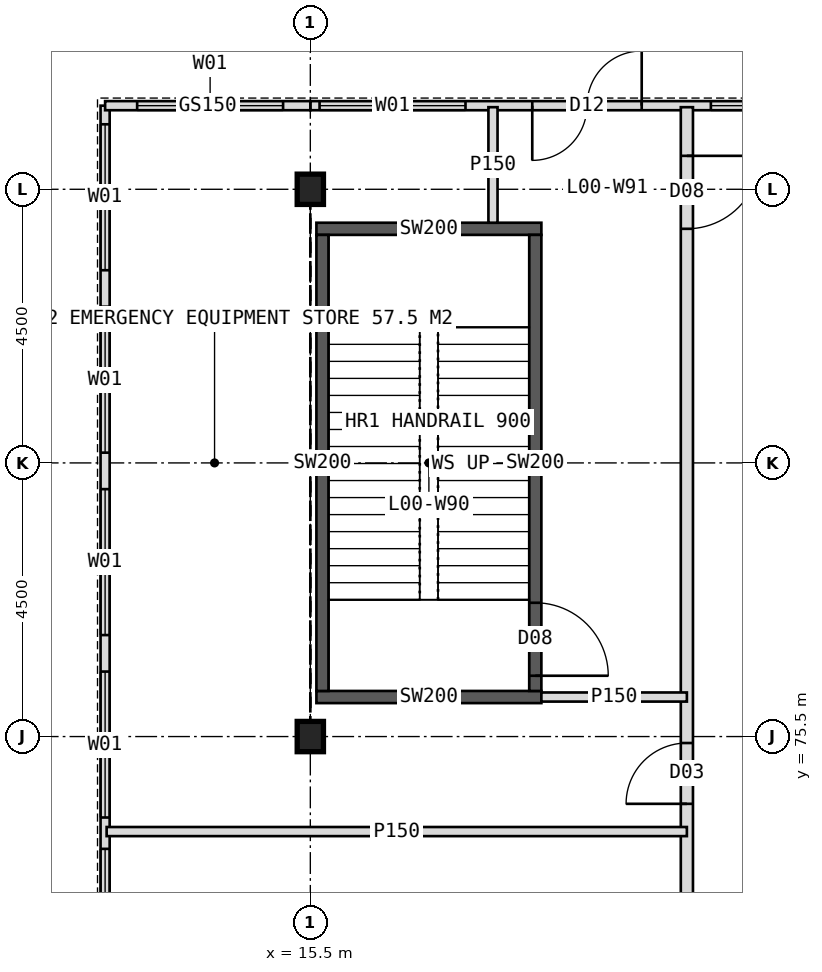
"""IFC4 building model, lengths in metres.
Left out: names, types, materials, properties, quantities, classifications, styles, units other than length and angle.
Written with IfcOpenShell. Run it as: python <this file> out.ifc"""

import sys

from ifc_helpers import new_model, si_unit, direction, frame, frame_2d, origin, origin_2d, place, context, subcontext, project, spatial, rectangle, i_section, extrude, element, fill, save


model = new_model("IFC4")
c1 = context("Model", 3, precision=1e-05, world=origin(), true_north=direction((0.0, 1.0)))
c2 = subcontext(c1, "Body", "Model", "MODEL_VIEW")
j1 = project(units=[si_unit("LENGTHUNIT", "METRE"), si_unit("PLANEANGLEUNIT", "RADIAN")], contexts=[c1])
p1 = place(None, origin())
s1 = spatial("IfcSite", under=j1, at=p1, CompositionType="ELEMENT")
p2 = place(p1, origin())
s2 = spatial("IfcBuilding", under=s1, at=p2, CompositionType="ELEMENT")
p3 = place(p2, origin())
s3 = spatial("IfcBuildingStorey", under=s2, at=p3, CompositionType="ELEMENT", Elevation=0.0)
for number, where, z_axis, x_axis in (
    (1, (15.5, 75.5, 0.0), (0.0, 0.0, 1.0), (1.0, 0.0, 0.0)),
    (2, (15.5, 84.5, 0.0), (0.0, 0.0, 1.0), (1.0, 0.0, 0.0)),
):
    element("IfcColumn", number, at=place(p3, frame(where, z_axis=z_axis, x_axis=x_axis)), inside=s3, PredefinedType="COLUMN", context=c2, shape_type="SweptSolid", body=[
        extrude(i_section(OverallWidth=0.432, OverallDepth=0.498, WebThickness=0.056, FlangeThickness=0.089, FilletRadius=0.015, at=origin_2d()), origin(), (0.0, 0.0, 1.0), 6.0),
    ])
p4 = place(p3, frame((12.125, 85.875, 0.0), z_axis=(0.0, 0.0, 1.0), x_axis=(0.0, -1.0, 0.0)))
e3 = element("IfcWall", 3, at=p4, inside=s3, PredefinedType="STANDARD", context=c2, shape_type="SweptSolid", body=[
    extrude(rectangle(XDim=47.75, YDim=0.15, at=frame_2d((23.875, 0.0))), origin(), (0.0, 0.0, 1.0), 6.0),
])
p5 = place(p4, frame((22.7, 0.0, 0.0)))
e4 = element("IfcOpeningElement", 4, at=p5, cuts=e3, PredefinedType="OPENING", context=c2, shape_type="SweptSolid", body=[
    extrude(rectangle(XDim=2.4, YDim=2.7, at=frame_2d((1.2, 1.35))), frame((0.0, 0.085, 0.0), z_axis=(0.0, -1.0, 0.0), x_axis=(1.0, 0.0, 0.0)), (0.0, 0.0, 1.0), 0.17),
])
p6 = place(p4, frame((0.306, 0.0, 0.6)))
e5 = element("IfcOpeningElement", 5, at=p6, cuts=e3, PredefinedType="OPENING", context=c2, shape_type="SweptSolid", body=[
    extrude(rectangle(XDim=2.4, YDim=3.0, at=frame_2d((1.2, 1.5))), frame((0.0, 0.085, 0.0), z_axis=(0.0, -1.0, 0.0), x_axis=(1.0, 0.0, 0.0)), (0.0, 0.0, 1.0), 0.17),
])
p7 = place(p4, frame((3.306, 0.0, 0.6)))
e6 = element("IfcOpeningElement", 6, at=p7, cuts=e3, PredefinedType="OPENING", context=c2, shape_type="SweptSolid", body=[
    extrude(rectangle(XDim=2.4, YDim=3.0, at=frame_2d((1.2, 1.5))), frame((0.0, 0.085, 0.0), z_axis=(0.0, -1.0, 0.0), x_axis=(1.0, 0.0, 0.0)), (0.0, 0.0, 1.0), 0.17),
])
p8 = place(p4, frame((6.306, 0.0, 0.6)))
e7 = element("IfcOpeningElement", 7, at=p8, cuts=e3, PredefinedType="OPENING", context=c2, shape_type="SweptSolid", body=[
    extrude(rectangle(XDim=2.4, YDim=3.0, at=frame_2d((1.2, 1.5))), frame((0.0, 0.085, 0.0), z_axis=(0.0, -1.0, 0.0), x_axis=(1.0, 0.0, 0.0)), (0.0, 0.0, 1.0), 0.17),
])
p9 = place(p4, frame((9.306, 0.0, 0.6)))
e8 = element("IfcOpeningElement", 8, at=p9, cuts=e3, PredefinedType="OPENING", context=c2, shape_type="SweptSolid", body=[
    extrude(rectangle(XDim=2.4, YDim=3.0, at=frame_2d((1.2, 1.5))), frame((0.0, 0.085, 0.0), z_axis=(0.0, -1.0, 0.0), x_axis=(1.0, 0.0, 0.0)), (0.0, 0.0, 1.0), 0.17),
])
p10 = place(p4, frame((12.222, 0.0, 0.6)))
e9 = element("IfcOpeningElement", 9, at=p10, cuts=e3, PredefinedType="OPENING", context=c2, shape_type="SweptSolid", body=[
    extrude(rectangle(XDim=2.4, YDim=3.0, at=frame_2d((1.2, 1.5))), frame((0.0, 0.085, 0.0), z_axis=(0.0, -1.0, 0.0), x_axis=(1.0, 0.0, 0.0)), (0.0, 0.0, 1.0), 0.17),
])
p11 = place(p4, frame((15.222, 0.0, 0.6)))
e10 = element("IfcOpeningElement", 10, at=p11, cuts=e3, PredefinedType="OPENING", context=c2, shape_type="SweptSolid", body=[
    extrude(rectangle(XDim=2.4, YDim=3.0, at=frame_2d((1.2, 1.5))), frame((0.0, 0.085, 0.0), z_axis=(0.0, -1.0, 0.0), x_axis=(1.0, 0.0, 0.0)), (0.0, 0.0, 1.0), 0.17),
])
p12 = place(p4, frame((18.198, 0.0, 0.6)))
e11 = element("IfcOpeningElement", 11, at=p12, cuts=e3, PredefinedType="OPENING", context=c2, shape_type="SweptSolid", body=[
    extrude(rectangle(XDim=2.4, YDim=3.0, at=frame_2d((1.2, 1.5))), frame((0.0, 0.085, 0.0), z_axis=(0.0, -1.0, 0.0), x_axis=(1.0, 0.0, 0.0)), (0.0, 0.0, 1.0), 0.17),
])
p13 = place(p4, frame((27.131, 0.0, 0.6)))
e12 = element("IfcOpeningElement", 12, at=p13, cuts=e3, PredefinedType="OPENING", context=c2, shape_type="SweptSolid", body=[
    extrude(rectangle(XDim=2.4, YDim=3.0, at=frame_2d((1.2, 1.5))), frame((0.0, 0.085, 0.0), z_axis=(0.0, -1.0, 0.0), x_axis=(1.0, 0.0, 0.0)), (0.0, 0.0, 1.0), 0.17),
])
p14 = place(p4, frame((30.131, 0.0, 0.6)))
e13 = element("IfcOpeningElement", 13, at=p14, cuts=e3, PredefinedType="OPENING", context=c2, shape_type="SweptSolid", body=[
    extrude(rectangle(XDim=2.4, YDim=3.0, at=frame_2d((1.2, 1.5))), frame((0.0, 0.085, 0.0), z_axis=(0.0, -1.0, 0.0), x_axis=(1.0, 0.0, 0.0)), (0.0, 0.0, 1.0), 0.17),
])
p15 = place(p4, frame((33.125, 0.0, 0.6)))
e14 = element("IfcOpeningElement", 14, at=p15, cuts=e3, PredefinedType="OPENING", context=c2, shape_type="SweptSolid", body=[
    extrude(rectangle(XDim=2.4, YDim=3.0, at=frame_2d((1.2, 1.5))), frame((0.0, 0.085, 0.0), z_axis=(0.0, -1.0, 0.0), x_axis=(1.0, 0.0, 0.0)), (0.0, 0.0, 1.0), 0.17),
])
p16 = place(p4, frame((36.125, 0.0, 0.6)))
e15 = element("IfcOpeningElement", 15, at=p16, cuts=e3, PredefinedType="OPENING", context=c2, shape_type="SweptSolid", body=[
    extrude(rectangle(XDim=2.4, YDim=3.0, at=frame_2d((1.2, 1.5))), frame((0.0, 0.085, 0.0), z_axis=(0.0, -1.0, 0.0), x_axis=(1.0, 0.0, 0.0)), (0.0, 0.0, 1.0), 0.17),
])
p17 = place(p4, frame((39.089, 0.0, 0.6)))
e16 = element("IfcOpeningElement", 16, at=p17, cuts=e3, PredefinedType="OPENING", context=c2, shape_type="SweptSolid", body=[
    extrude(rectangle(XDim=2.4, YDim=3.0, at=frame_2d((1.2, 1.5))), frame((0.0, 0.085, 0.0), z_axis=(0.0, -1.0, 0.0), x_axis=(1.0, 0.0, 0.0)), (0.0, 0.0, 1.0), 0.17),
])
p18 = place(p4, frame((42.028, 0.0, 0.6)))
e17 = element("IfcOpeningElement", 17, at=p18, cuts=e3, PredefinedType="OPENING", context=c2, shape_type="SweptSolid", body=[
    extrude(rectangle(XDim=2.4, YDim=3.0, at=frame_2d((1.2, 1.5))), frame((0.0, 0.085, 0.0), z_axis=(0.0, -1.0, 0.0), x_axis=(1.0, 0.0, 0.0)), (0.0, 0.0, 1.0), 0.17),
])
p19 = place(p4, frame((45.028, 0.0, 0.6)))
e18 = element("IfcOpeningElement", 18, at=p19, cuts=e3, PredefinedType="OPENING", context=c2, shape_type="SweptSolid", body=[
    extrude(rectangle(XDim=2.4, YDim=3.0, at=frame_2d((1.2, 1.5))), frame((0.0, 0.085, 0.0), z_axis=(0.0, -1.0, 0.0), x_axis=(1.0, 0.0, 0.0)), (0.0, 0.0, 1.0), 0.17),
])
p20 = place(p3, frame((33.841, 85.875, 0.0), z_axis=(0.0, 0.0, 1.0), x_axis=(-1.0, 0.0, 0.0)))
e19 = element("IfcWall", 19, at=p20, inside=s3, PredefinedType="STANDARD", context=c2, shape_type="SweptSolid", body=[
    extrude(rectangle(XDim=18.341, YDim=0.15, at=frame_2d((9.17, 0.0))), origin(), (0.0, 0.0, 1.0), 5.1),
])
p21 = place(p20, frame((12.891, 0.0, 0.0)))
e20 = element("IfcOpeningElement", 20, at=p21, cuts=e19, PredefinedType="OPENING", context=c2, shape_type="SweptSolid", body=[
    extrude(rectangle(XDim=1.8, YDim=2.4, at=frame_2d((0.9, 1.2))), frame((0.0, 0.085, 0.0), z_axis=(0.0, -1.0, 0.0), x_axis=(1.0, 0.0, 0.0)), (0.0, 0.0, 1.0), 0.17),
])
p22 = place(p20, frame((0.0, 0.0, 0.6)))
e21 = element("IfcOpeningElement", 21, at=p22, cuts=e19, PredefinedType="OPENING", context=c2, shape_type="SweptSolid", body=[
    extrude(rectangle(XDim=2.4, YDim=3.0, at=frame_2d((1.2, 1.5))), frame((0.0, 0.085, 0.0), z_axis=(0.0, -1.0, 0.0), x_axis=(1.0, 0.0, 0.0)), (0.0, 0.0, 1.0), 0.17),
])
p23 = place(p20, frame((3.0, 0.0, 0.6)))
e22 = element("IfcOpeningElement", 22, at=p23, cuts=e19, PredefinedType="OPENING", context=c2, shape_type="SweptSolid", body=[
    extrude(rectangle(XDim=2.4, YDim=3.0, at=frame_2d((1.2, 1.5))), frame((0.0, 0.085, 0.0), z_axis=(0.0, -1.0, 0.0), x_axis=(1.0, 0.0, 0.0)), (0.0, 0.0, 1.0), 0.17),
])
p24 = place(p20, frame((6.0, 0.0, 0.6)))
e23 = element("IfcOpeningElement", 23, at=p24, cuts=e19, PredefinedType="OPENING", context=c2, shape_type="SweptSolid", body=[
    extrude(rectangle(XDim=2.4, YDim=3.0, at=frame_2d((1.2, 1.5))), frame((0.0, 0.085, 0.0), z_axis=(0.0, -1.0, 0.0), x_axis=(1.0, 0.0, 0.0)), (0.0, 0.0, 1.0), 0.17),
])
p25 = place(p20, frame((9.354, 0.0, 0.6)))
e24 = element("IfcOpeningElement", 24, at=p25, cuts=e19, PredefinedType="OPENING", context=c2, shape_type="SweptSolid", body=[
    extrude(rectangle(XDim=2.4, YDim=3.0, at=frame_2d((1.2, 1.5))), frame((0.0, 0.085, 0.0), z_axis=(0.0, -1.0, 0.0), x_axis=(1.0, 0.0, 0.0)), (0.0, 0.0, 1.0), 0.17),
])
p26 = place(p20, frame((15.789, 0.0, 0.6)))
e25 = element("IfcOpeningElement", 25, at=p26, cuts=e19, PredefinedType="OPENING", context=c2, shape_type="SweptSolid", body=[
    extrude(rectangle(XDim=2.4, YDim=3.0, at=frame_2d((1.2, 1.5))), frame((0.0, 0.085, 0.0), z_axis=(0.0, -1.0, 0.0), x_axis=(1.0, 0.0, 0.0)), (0.0, 0.0, 1.0), 0.17),
])
p27 = place(p3, frame((15.5, 85.875, 0.0), z_axis=(0.0, 0.0, 1.0), x_axis=(-1.0, 0.0, 0.0)))
e26 = element("IfcWall", 26, at=p27, inside=s3, PredefinedType="STANDARD", context=c2, shape_type="SweptSolid", body=[
    extrude(rectangle(XDim=3.375, YDim=0.15, at=frame_2d((1.688, 0.0))), origin(), (0.0, 0.0, 1.0), 6.0),
])
p28 = place(p27, frame((0.448, 0.0, 0.6)))
e27 = element("IfcOpeningElement", 27, at=p28, cuts=e26, PredefinedType="OPENING", context=c2, shape_type="SweptSolid", body=[
    extrude(rectangle(XDim=2.4, YDim=3.0, at=frame_2d((1.2, 1.5))), frame((0.0, 0.085, 0.0), z_axis=(0.0, -1.0, 0.0), x_axis=(1.0, 0.0, 0.0)), (0.0, 0.0, 1.0), 0.17),
])
p29 = place(p3, frame((21.693, 38.15, 0.0), z_axis=(0.0, 0.0, 1.0), x_axis=(0.0, 1.0, 0.0)))
e28 = element("IfcWall", 28, at=p29, inside=s3, PredefinedType="PARTITIONING", context=c2, shape_type="SweptSolid", body=[
    extrude(rectangle(XDim=47.7, YDim=0.2, at=frame_2d((23.85, 0.0))), origin(), (0.0, 0.0, 1.0), 5.7),
])
p30 = place(p29, frame((45.7, 0.0, 0.0)))
e29 = element("IfcOpeningElement", 29, at=p30, cuts=e28, PredefinedType="OPENING", context=c2, shape_type="SweptSolid", body=[
    extrude(rectangle(XDim=1.2, YDim=2.1, at=frame_2d((0.6, 1.05))), frame((0.0, 0.11, 0.0), z_axis=(0.0, -1.0, 0.0), x_axis=(1.0, 0.0, 0.0)), (0.0, 0.0, 1.0), 0.22),
])
p31 = place(p29, frame((36.244, 0.0, 0.0)))
e30 = element("IfcOpeningElement", 30, at=p31, cuts=e28, PredefinedType="OPENING", context=c2, shape_type="SweptSolid", body=[
    extrude(rectangle(XDim=1.0, YDim=2.1, at=frame_2d((0.5, 1.05))), frame((0.0, 0.11, 0.0), z_axis=(0.0, -1.0, 0.0), x_axis=(1.0, 0.0, 0.0)), (0.0, 0.0, 1.0), 0.22),
])
p32 = place(p29, frame((2.222, 0.0, 0.0)))
e31 = element("IfcOpeningElement", 31, at=p32, cuts=e28, PredefinedType="OPENING", context=c2, shape_type="SweptSolid", body=[
    extrude(rectangle(XDim=1.4, YDim=2.2, at=frame_2d((0.7, 1.1))), frame((0.0, 0.11, 0.0), z_axis=(0.0, -1.0, 0.0), x_axis=(1.0, 0.0, 0.0)), (0.0, 0.0, 1.0), 0.22),
])
p33 = place(p29, frame((6.836, 0.0, 0.0)))
e32 = element("IfcOpeningElement", 32, at=p33, cuts=e28, PredefinedType="OPENING", context=c2, shape_type="SweptSolid", body=[
    extrude(rectangle(XDim=1.0, YDim=2.1, at=frame_2d((0.5, 1.05))), frame((0.0, 0.11, 0.0), z_axis=(0.0, -1.0, 0.0), x_axis=(1.0, 0.0, 0.0)), (0.0, 0.0, 1.0), 0.22),
])
p34 = place(p29, frame((11.113, 0.0, 0.0)))
e33 = element("IfcOpeningElement", 33, at=p34, cuts=e28, PredefinedType="OPENING", context=c2, shape_type="SweptSolid", body=[
    extrude(rectangle(XDim=1.4, YDim=2.2, at=frame_2d((0.7, 1.1))), frame((0.0, 0.11, 0.0), z_axis=(0.0, -1.0, 0.0), x_axis=(1.0, 0.0, 0.0)), (0.0, 0.0, 1.0), 0.22),
])
p35 = place(p29, frame((17.081, 0.0, 0.0)))
e34 = element("IfcOpeningElement", 34, at=p35, cuts=e28, PredefinedType="OPENING", context=c2, shape_type="SweptSolid", body=[
    extrude(rectangle(XDim=1.4, YDim=2.2, at=frame_2d((0.7, 1.1))), frame((0.0, 0.11, 0.0), z_axis=(0.0, -1.0, 0.0), x_axis=(1.0, 0.0, 0.0)), (0.0, 0.0, 1.0), 0.22),
])
p36 = place(p29, frame((23.05, 0.0, 0.0)))
e35 = element("IfcOpeningElement", 35, at=p36, cuts=e28, PredefinedType="OPENING", context=c2, shape_type="SweptSolid", body=[
    extrude(rectangle(XDim=1.4, YDim=2.2, at=frame_2d((0.7, 1.1))), frame((0.0, 0.11, 0.0), z_axis=(0.0, -1.0, 0.0), x_axis=(1.0, 0.0, 0.0)), (0.0, 0.0, 1.0), 0.22),
])
p37 = place(p29, frame((27.527, 0.0, 0.0)))
e36 = element("IfcOpeningElement", 36, at=p37, cuts=e28, PredefinedType="OPENING", context=c2, shape_type="SweptSolid", body=[
    extrude(rectangle(XDim=1.4, YDim=2.2, at=frame_2d((0.7, 1.1))), frame((0.0, 0.11, 0.0), z_axis=(0.0, -1.0, 0.0), x_axis=(1.0, 0.0, 0.0)), (0.0, 0.0, 1.0), 0.22),
])
p38 = place(p29, frame((32.203, 0.0, 0.0)))
e37 = element("IfcOpeningElement", 37, at=p38, cuts=e28, PredefinedType="OPENING", context=c2, shape_type="SweptSolid", body=[
    extrude(rectangle(XDim=1.0, YDim=2.1, at=frame_2d((0.5, 1.05))), frame((0.0, 0.11, 0.0), z_axis=(0.0, -1.0, 0.0), x_axis=(1.0, 0.0, 0.0)), (0.0, 0.0, 1.0), 0.22),
])
for number, where, z_axis, x_axis in (
    (38, (15.6, 76.15, 0.0), (0.0, 0.0, 1.0), (1.0, 0.0, 0.0)),
    (39, (15.6, 83.85, 0.0), (0.0, 0.0, 1.0), (1.0, 0.0, 0.0)),
):
    element("IfcWall", number, at=place(p3, frame(where, z_axis=z_axis, x_axis=x_axis)), inside=s3, PredefinedType="SOLIDWALL", context=c2, shape_type="SweptSolid", body=[
        extrude(rectangle(XDim=3.7, YDim=0.2, at=frame_2d((1.85, 0.0))), origin(), (0.0, 0.0, 1.0), 5.7),
    ])
p39 = place(p3, frame((15.7, 76.25, 0.0), z_axis=(0.0, 0.0, 1.0), x_axis=(0.0, 1.0, 0.0)))
e40 = element("IfcWall", 40, at=p39, inside=s3, PredefinedType="SOLIDWALL", context=c2, shape_type="SweptSolid", body=[
    extrude(rectangle(XDim=7.5, YDim=0.2, at=frame_2d((3.75, 0.0))), origin(), (0.0, 0.0, 1.0), 5.7),
])
p40 = place(p3, frame((19.2, 76.25, 0.0), z_axis=(0.0, 0.0, 1.0), x_axis=(0.0, 1.0, 0.0)))
e41 = element("IfcWall", 41, at=p40, inside=s3, PredefinedType="SOLIDWALL", context=c2, shape_type="SweptSolid", body=[
    extrude(rectangle(XDim=7.5, YDim=0.2, at=frame_2d((3.75, 0.0))), origin(), (0.0, 0.0, 1.0), 5.7),
])
p41 = place(p40, frame((0.25, 0.0, 0.0)))
e42 = element("IfcOpeningElement", 42, at=p41, cuts=e41, PredefinedType="OPENING", context=c2, shape_type="SweptSolid", body=[
    extrude(rectangle(XDim=1.2, YDim=2.1, at=frame_2d((0.6, 1.05))), frame((0.0, 0.11, 0.0), z_axis=(0.0, -1.0, 0.0), x_axis=(1.0, 0.0, 0.0)), (0.0, 0.0, 1.0), 0.22),
])
p42 = place(p3, frame((19.3, 76.15, 0.0), z_axis=(0.0, 0.0, 1.0), x_axis=(1.0, 0.0, 0.0)))
e43 = element("IfcWall", 43, at=p42, inside=s3, PredefinedType="PARTITIONING", context=c2, shape_type="SweptSolid", body=[
    extrude(rectangle(XDim=2.393, YDim=0.15, at=frame_2d((1.197, 0.0))), origin(), (0.0, 0.0, 1.0), 5.7),
])
p43 = place(p3, frame((18.504, 83.95, 0.0), z_axis=(0.0, 0.0, 1.0), x_axis=(0.0, 1.0, 0.0)))
e44 = element("IfcWall", 44, at=p43, inside=s3, PredefinedType="PARTITIONING", context=c2, shape_type="SweptSolid", body=[
    extrude(rectangle(XDim=1.9, YDim=0.15, at=frame_2d((0.95, 0.0))), origin(), (0.0, 0.0, 1.0), 5.7),
])
p44 = place(p3, frame((12.15, 73.938, 0.0), z_axis=(0.0, 0.0, 1.0), x_axis=(1.0, 0.0, 0.0)))
e45 = element("IfcWall", 45, at=p44, inside=s3, PredefinedType="PARTITIONING", context=c2, shape_type="SweptSolid", body=[
    extrude(rectangle(XDim=9.543, YDim=0.15, at=frame_2d((4.771, 0.0))), origin(), (0.0, 0.0, 1.0), 5.7),
])
p45 = place(p6, origin())
e46 = element("IfcWindow", 46, at=p45, inside=s3, PartitioningType="SINGLE_PANEL", PredefinedType="WINDOW", context=c2, shape_type="SweptSolid", body=[
    extrude(rectangle(XDim=2.4, YDim=3.0, at=frame_2d((1.2, 1.5))), frame((0.0, 0.03, 0.0), z_axis=(0.0, -1.0, 0.0), x_axis=(1.0, 0.0, 0.0)), (0.0, 0.0, 1.0), 0.06),
])
fill(e5, e46)
p46 = place(p7, origin())
e47 = element("IfcWindow", 47, at=p46, inside=s3, PartitioningType="SINGLE_PANEL", PredefinedType="WINDOW", context=c2, shape_type="SweptSolid", body=[
    extrude(rectangle(XDim=2.4, YDim=3.0, at=frame_2d((1.2, 1.5))), frame((0.0, 0.03, 0.0), z_axis=(0.0, -1.0, 0.0), x_axis=(1.0, 0.0, 0.0)), (0.0, 0.0, 1.0), 0.06),
])
fill(e6, e47)
p47 = place(p8, origin())
e48 = element("IfcWindow", 48, at=p47, inside=s3, PartitioningType="SINGLE_PANEL", PredefinedType="WINDOW", context=c2, shape_type="SweptSolid", body=[
    extrude(rectangle(XDim=2.4, YDim=3.0, at=frame_2d((1.2, 1.5))), frame((0.0, 0.03, 0.0), z_axis=(0.0, -1.0, 0.0), x_axis=(1.0, 0.0, 0.0)), (0.0, 0.0, 1.0), 0.06),
])
fill(e7, e48)
p48 = place(p9, origin())
e49 = element("IfcWindow", 49, at=p48, inside=s3, PartitioningType="SINGLE_PANEL", PredefinedType="WINDOW", context=c2, shape_type="SweptSolid", body=[
    extrude(rectangle(XDim=2.4, YDim=3.0, at=frame_2d((1.2, 1.5))), frame((0.0, 0.03, 0.0), z_axis=(0.0, -1.0, 0.0), x_axis=(1.0, 0.0, 0.0)), (0.0, 0.0, 1.0), 0.06),
])
fill(e8, e49)
p49 = place(p10, origin())
e50 = element("IfcWindow", 50, at=p49, inside=s3, PartitioningType="SINGLE_PANEL", PredefinedType="WINDOW", context=c2, shape_type="SweptSolid", body=[
    extrude(rectangle(XDim=2.4, YDim=3.0, at=frame_2d((1.2, 1.5))), frame((0.0, 0.03, 0.0), z_axis=(0.0, -1.0, 0.0), x_axis=(1.0, 0.0, 0.0)), (0.0, 0.0, 1.0), 0.06),
])
fill(e9, e50)
p50 = place(p21, frame((1.8, 0.0, 0.0), z_axis=(0.0, 0.0, 1.0), x_axis=(-1.0, 0.0, 0.0)))
e51 = element("IfcDoor", 51, at=p50, inside=s3, OperationType="DOUBLE_DOOR_SINGLE_SWING", PredefinedType="DOOR", context=c2, shape_type="SweptSolid", body=[
    extrude(rectangle(XDim=1.8, YDim=2.4, at=frame_2d((0.9, 1.2))), frame((0.0, 0.025, 0.0), z_axis=(0.0, -1.0, 0.0), x_axis=(1.0, 0.0, 0.0)), (0.0, 0.0, 1.0), 0.05),
])
fill(e20, e51)
p51 = place(p25, origin())
e52 = element("IfcWindow", 52, at=p51, inside=s3, PartitioningType="SINGLE_PANEL", PredefinedType="WINDOW", context=c2, shape_type="SweptSolid", body=[
    extrude(rectangle(XDim=2.4, YDim=3.0, at=frame_2d((1.2, 1.5))), frame((0.0, 0.03, 0.0), z_axis=(0.0, -1.0, 0.0), x_axis=(1.0, 0.0, 0.0)), (0.0, 0.0, 1.0), 0.06),
])
fill(e24, e52)
p52 = place(p26, origin())
e53 = element("IfcWindow", 53, at=p52, inside=s3, PartitioningType="SINGLE_PANEL", PredefinedType="WINDOW", context=c2, shape_type="SweptSolid", body=[
    extrude(rectangle(XDim=2.4, YDim=3.0, at=frame_2d((1.2, 1.5))), frame((0.0, 0.03, 0.0), z_axis=(0.0, -1.0, 0.0), x_axis=(1.0, 0.0, 0.0)), (0.0, 0.0, 1.0), 0.06),
])
fill(e25, e53)
p53 = place(p28, origin())
e54 = element("IfcWindow", 54, at=p53, inside=s3, PartitioningType="SINGLE_PANEL", PredefinedType="WINDOW", context=c2, shape_type="SweptSolid", body=[
    extrude(rectangle(XDim=2.4, YDim=3.0, at=frame_2d((1.2, 1.5))), frame((0.0, 0.03, 0.0), z_axis=(0.0, -1.0, 0.0), x_axis=(1.0, 0.0, 0.0)), (0.0, 0.0, 1.0), 0.06),
])
fill(e27, e54)
p54 = place(p41, frame((1.2, 0.0, 0.0), z_axis=(0.0, 0.0, 1.0), x_axis=(-1.0, 0.0, 0.0)))
e55 = element("IfcDoor", 55, at=p54, inside=s3, OperationType="SINGLE_SWING_RIGHT", PredefinedType="DOOR", context=c2, shape_type="SweptSolid", body=[
    extrude(rectangle(XDim=1.2, YDim=2.1, at=frame_2d((0.6, 1.05))), frame((0.0, 0.025, 0.0), z_axis=(0.0, -1.0, 0.0), x_axis=(1.0, 0.0, 0.0)), (0.0, 0.0, 1.0), 0.05),
])
fill(e42, e55)
p55 = place(p30, frame((1.2, 0.0, 0.0), z_axis=(0.0, 0.0, 1.0), x_axis=(-1.0, 0.0, 0.0)))
e56 = element("IfcDoor", 56, at=p55, inside=s3, OperationType="SINGLE_SWING_LEFT", PredefinedType="DOOR", context=c2, shape_type="SweptSolid", body=[
    extrude(rectangle(XDim=1.2, YDim=2.1, at=frame_2d((0.6, 1.05))), frame((0.0, 0.025, 0.0), z_axis=(0.0, -1.0, 0.0), x_axis=(1.0, 0.0, 0.0)), (0.0, 0.0, 1.0), 0.05),
])
fill(e29, e56)
p56 = place(p31, origin())
e57 = element("IfcDoor", 57, at=p56, inside=s3, OperationType="SINGLE_SWING_LEFT", PredefinedType="DOOR", context=c2, shape_type="SweptSolid", body=[
    extrude(rectangle(XDim=1.0, YDim=2.1, at=frame_2d((0.5, 1.05))), frame((0.0, 0.025, 0.0), z_axis=(0.0, -1.0, 0.0), x_axis=(1.0, 0.0, 0.0)), (0.0, 0.0, 1.0), 0.05),
])
fill(e30, e57)
save(model, sys.argv[1])
